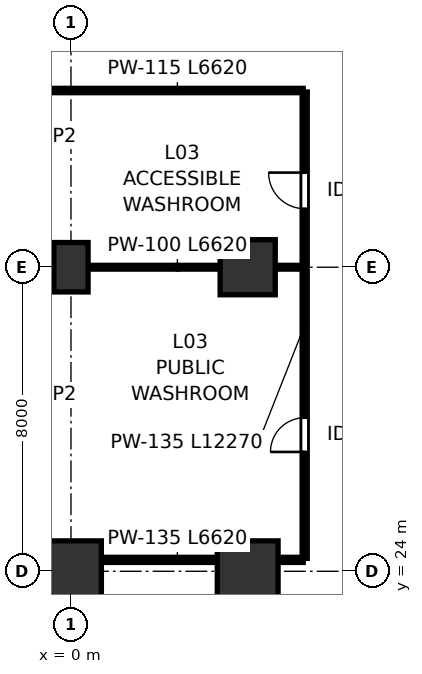
"""IFC4 building model, lengths in metres.
Left out: names, types, materials, properties, quantities, classifications, styles, units other than length and angle.
Written with IfcOpenShell. Run it as: python <this file> out.ifc"""

import sys

from ifc_helpers import new_model, si_unit, direction, frame, frame_2d, origin, origin_2d, place, context, subcontext, project, spatial, rectangle, extrude, source, transform, mapped, element, fill, save


model = new_model("IFC4")
c1 = context("Model", 3, precision=1e-05, world=origin(), true_north=direction((0.0, 1.0)))
c2 = subcontext(c1, "Body", "Model", "MODEL_VIEW")
j1 = project(units=[si_unit("LENGTHUNIT", "METRE"), si_unit("PLANEANGLEUNIT", "RADIAN")], contexts=[c1])
p1 = place(None, origin())
s1 = spatial("IfcSite", under=j1, at=p1, CompositionType="ELEMENT")
p2 = place(p1, origin())
s2 = spatial("IfcBuilding", under=s1, at=p2, CompositionType="ELEMENT")
p3 = place(p2, frame((0.0, 0.0, 12.0)))
s3 = spatial("IfcBuildingStorey", under=s2, at=p3, CompositionType="ELEMENT", Elevation=12.0)
m1 = source(origin(), c2, "Body", "SweptSolid", [
    extrude(rectangle(XDim=1.6, YDim=1.6, at=origin_2d()), origin(), (0.0, 0.0, 1.0), 5.398),
])
p4 = place(p3, frame((0.0, 24.0, 0.001), z_axis=(0.0, 0.0, 1.0), x_axis=(1.0, 0.0, 0.0)))
e1 = element("IfcColumn", 1, at=p4, inside=s3, PredefinedType="COLUMN", context=c2, shape_type="MappedRepresentation", body=[
    mapped(m1, transform((0.0, 0.0, 0.0), scale=1.0)),
])
m2 = source(origin(), c2, "Body", "SweptSolid", [
    extrude(rectangle(XDim=0.9, YDim=1.3, at=origin_2d()), origin(), (0.0, 0.0, 1.0), 5.398),
])
p5 = place(p3, frame((0.0, 32.0, 0.001), z_axis=(0.0, 0.0, 1.0), x_axis=(1.0, 0.0, 0.0)))
e2 = element("IfcColumn", 2, at=p5, inside=s3, PredefinedType="PILASTER", context=c2, shape_type="MappedRepresentation", body=[
    mapped(m2, transform((0.0, 0.0, 0.0), scale=1.0)),
])
p6 = place(p3, frame((4.65, 24.0, 0.001), z_axis=(0.0, 0.0, 1.0), x_axis=(1.0, 0.0, 0.0)))
e3 = element("IfcColumn", 3, at=p6, inside=s3, PredefinedType="COLUMN", context=c2, shape_type="MappedRepresentation", body=[
    mapped(m1, transform((0.0, 0.0, 0.0), scale=1.0)),
])
m3 = source(origin(), c2, "Body", "SweptSolid", [
    extrude(rectangle(XDim=1.45, YDim=1.45, at=origin_2d()), origin(), (0.0, 0.0, 1.0), 5.398),
])
p7 = place(p3, frame((4.65, 32.0, 0.001), z_axis=(0.0, 0.0, 1.0), x_axis=(1.0, 0.0, 0.0)))
e4 = element("IfcColumn", 4, at=p7, inside=s3, PredefinedType="COLUMN", context=c2, shape_type="MappedRepresentation", body=[
    mapped(m3, transform((0.0, 0.0, 0.0), scale=1.0)),
])
p8 = place(p3, frame((-0.51, 24.3, 0.0), z_axis=(0.0, 0.0, 1.0), x_axis=(1.0, 0.0, 0.0)))
e5 = element("IfcWall", 5, at=p8, inside=s3, PredefinedType="PARTITIONING", context=c2, shape_type="SweptSolid", body=[
    extrude(rectangle(XDim=6.62, YDim=0.135, at=frame_2d((3.31, 0.0))), origin(), (0.0, 0.0, 1.0), 4.27),
])
p9 = place(p3, frame((-0.51, 36.65, 0.0), z_axis=(0.0, 0.0, 1.0), x_axis=(1.0, 0.0, 0.0)))
e6 = element("IfcWall", 6, at=p9, inside=s3, PredefinedType="PARTITIONING", context=c2, shape_type="SweptSolid", body=[
    extrude(rectangle(XDim=6.62, YDim=0.115, at=frame_2d((3.31, 0.0))), origin(), (0.0, 0.0, 1.0), 4.275),
])
p10 = place(p3, frame((-0.51, 32.0, 0.0), z_axis=(0.0, 0.0, 1.0), x_axis=(1.0, 0.0, 0.0)))
e7 = element("IfcWall", 7, at=p10, inside=s3, PredefinedType="PARTITIONING", context=c2, shape_type="SweptSolid", body=[
    extrude(rectangle(XDim=6.62, YDim=0.1, at=frame_2d((3.31, 0.0))), origin(), (0.0, 0.0, 1.0), 4.275),
])
p11 = place(p3, frame((6.15, 24.34, 0.0), z_axis=(0.0, 0.0, 1.0), x_axis=(0.0, 1.0, 0.0)))
e8 = element("IfcWall", 8, at=p11, inside=s3, PredefinedType="PARTITIONING", context=c2, shape_type="SweptSolid", body=[
    extrude(rectangle(XDim=12.27, YDim=0.135, at=frame_2d((6.135, 0.0))), origin(), (0.0, 0.0, 1.0), 4.275),
])
p12 = place(p11, frame((2.8, 0.0, 0.0)))
e9 = element("IfcOpeningElement", 9, at=p12, cuts=e8, PredefinedType="OPENING", context=c2, shape_type="SweptSolid", body=[
    extrude(rectangle(XDim=0.9, YDim=2.15, at=frame_2d((0.45, 1.075))), frame((0.0, 0.078, 0.0), z_axis=(0.0, -1.0, 0.0), x_axis=(1.0, 0.0, 0.0)), (0.0, 0.0, 1.0), 0.155),
])
p13 = place(p11, frame((9.2, 0.0, 0.0)))
e10 = element("IfcOpeningElement", 10, at=p13, cuts=e8, PredefinedType="OPENING", context=c2, shape_type="SweptSolid", body=[
    extrude(rectangle(XDim=0.95, YDim=2.15, at=frame_2d((0.475, 1.075))), frame((0.0, 0.078, 0.0), z_axis=(0.0, -1.0, 0.0), x_axis=(1.0, 0.0, 0.0)), (0.0, 0.0, 1.0), 0.155),
])
m4 = source(origin(), c2, "Body", "SweptSolid", [
    extrude(rectangle(XDim=0.9, YDim=2.15, at=frame_2d((0.45, 1.075))), frame((0.0, 0.025, 0.0), z_axis=(0.0, -1.0, 0.0), x_axis=(1.0, 0.0, 0.0)), (0.0, 0.0, 1.0), 0.05),
])
p14 = place(p12, origin())
e11 = element("IfcDoor", 11, at=p14, inside=s3, OperationType="SINGLE_SWING_LEFT", PredefinedType="DOOR", context=c2, shape_type="MappedRepresentation", body=[
    mapped(m4, transform((0.0, 0.0, 0.0), scale=1.0)),
])
fill(e9, e11)
m5 = source(origin(), c2, "Body", "SweptSolid", [
    extrude(rectangle(XDim=0.95, YDim=2.15, at=frame_2d((0.475, 1.075))), frame((0.0, 0.025, 0.0), z_axis=(0.0, -1.0, 0.0), x_axis=(1.0, 0.0, 0.0)), (0.0, 0.0, 1.0), 0.05),
])
p15 = place(p13, origin())
e12 = element("IfcDoor", 12, at=p15, inside=s3, OperationType="SINGLE_SWING_RIGHT", PredefinedType="DOOR", context=c2, shape_type="MappedRepresentation", body=[
    mapped(m5, transform((0.0, 0.0, 0.0), scale=1.0)),
])
fill(e10, e12)
save(model, sys.argv[1])
